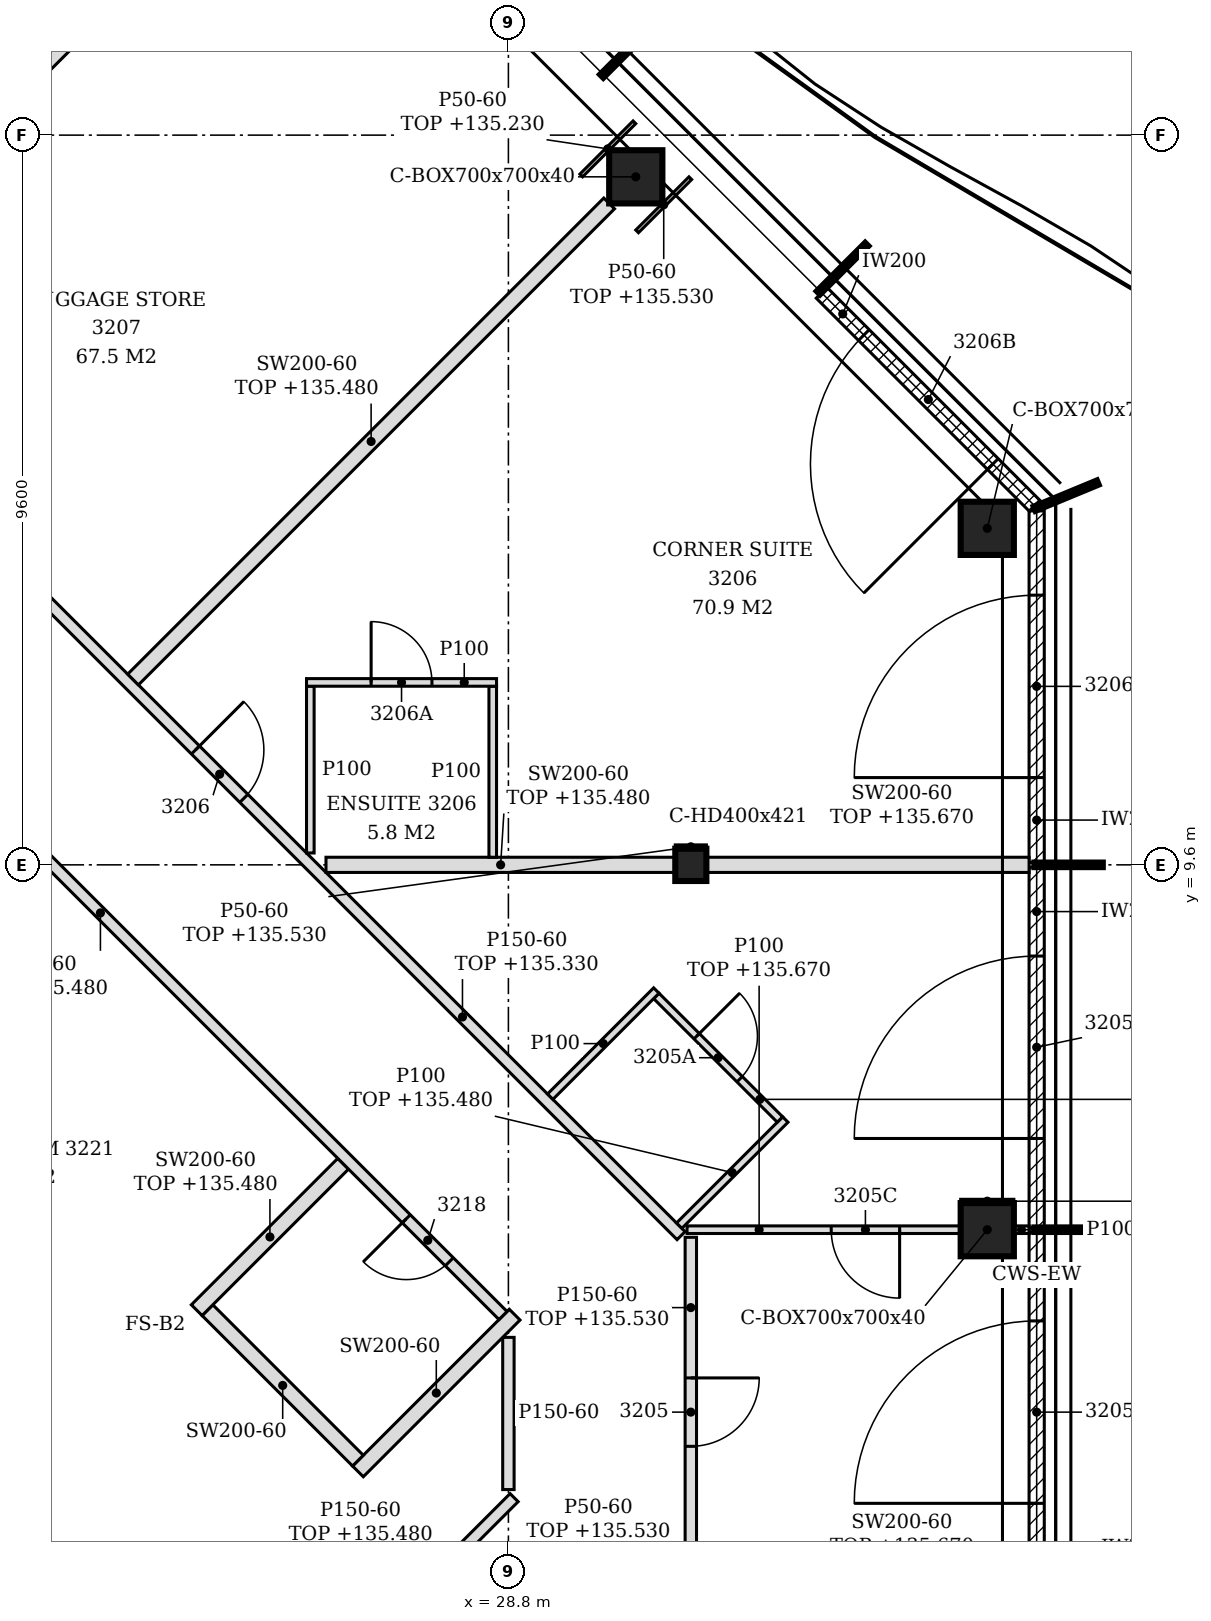
"""IFC4 building model, lengths in metres.
Left out: names, types, materials, properties, quantities, classifications, styles, units other than length and angle.
Written with IfcOpenShell. Run it as: python <this file> out.ifc"""

import sys

from ifc_helpers import new_model, si_unit, direction, frame, frame_2d, origin, origin_2d, place, context, subcontext, project, spatial, polyline, rectangle, hollow_rectangle, i_section, outline, extrude, element, fill, save


model = new_model("IFC4")
c1 = context("Model", 3, precision=1e-05, world=origin(), true_north=direction((0.0, 1.0)))
c2 = subcontext(c1, "Body", "Model", "MODEL_VIEW")
j1 = project(units=[si_unit("LENGTHUNIT", "METRE"), si_unit("PLANEANGLEUNIT", "RADIAN")], contexts=[c1])
p1 = place(None, origin())
s1 = spatial("IfcSite", under=j1, at=p1, CompositionType="ELEMENT")
p2 = place(p1, origin())
s2 = spatial("IfcBuilding", under=s1, at=p2, CompositionType="ELEMENT")
p3 = place(p2, frame((0.0, 0.0, 132.6)))
s3 = spatial("IfcBuildingStorey", under=s2, at=p3, CompositionType="ELEMENT", Elevation=132.6)
for number, where, z_axis, x_axis in (
    (1, (35.1, 4.8, -0.15), (0.0, 0.0, 1.0), (1.0, 0.0, 0.0)),
    (2, (35.1, 14.027, -0.15), (0.0, 0.0, 1.0), (1.0, 0.0, 0.0)),
    (3, (30.476, 18.652, -0.15), (0.0, 0.0, 1.0), (1.0, 0.0, 0.0)),
):
    element("IfcColumn", number, at=place(p3, frame(where, z_axis=z_axis, x_axis=x_axis)), inside=s3, PredefinedType="COLUMN", context=c2, shape_type="SweptSolid", body=[
        extrude(hollow_rectangle(XDim=0.7, YDim=0.7, WallThickness=0.04, at=origin_2d()), origin(), (0.0, 0.0, 1.0), 3.6),
    ])
p4 = place(p3, frame((31.2, 9.6, -0.15), z_axis=(0.0, 0.0, 1.0), x_axis=(1.0, 0.0, 0.0)))
e4 = element("IfcColumn", 4, at=p4, inside=s3, PredefinedType="COLUMN", context=c2, shape_type="SweptSolid", body=[
    extrude(i_section(OverallWidth=0.409, OverallDepth=0.425, WebThickness=0.033, FlangeThickness=0.052, FilletRadius=0.015, at=origin_2d()), origin(), (0.0, 0.0, 1.0), 3.6),
])
p5 = place(p3, frame((35.75, 0.03, 0.0), z_axis=(0.0, 0.0, 1.0), x_axis=(0.0, 1.0, 0.0)))
e5 = element("IfcWall", 5, at=p5, inside=s3, PredefinedType="NOTDEFINED", context=c2, shape_type="SweptSolid", body=[
    extrude(rectangle(XDim=4.74, YDim=0.2, at=frame_2d((2.37, 0.0))), origin(), (0.0, 0.0, 1.0), 3.45),
])
p6 = place(p5, frame((1.17, 0.0, 0.0)))
e6 = element("IfcOpeningElement", 6, at=p6, cuts=e5, PredefinedType="OPENING", context=c2, shape_type="SweptSolid", body=[
    extrude(rectangle(XDim=2.4, YDim=2.4, at=frame_2d((1.2, 1.2))), frame((0.0, 0.11, 0.0), z_axis=(0.0, -1.0, 0.0), x_axis=(1.0, 0.0, 0.0)), (0.0, 0.0, 1.0), 0.22),
])
p7 = place(p3, frame((35.75, 4.83, 0.0), z_axis=(0.0, 0.0, 1.0), x_axis=(0.0, 1.0, 0.0)))
e7 = element("IfcWall", 7, at=p7, inside=s3, PredefinedType="NOTDEFINED", context=c2, shape_type="SweptSolid", body=[
    extrude(rectangle(XDim=4.74, YDim=0.2, at=frame_2d((2.37, 0.0))), origin(), (0.0, 0.0, 1.0), 3.45),
])
p8 = place(p7, frame((1.17, 0.0, 0.0)))
e8 = element("IfcOpeningElement", 8, at=p8, cuts=e7, PredefinedType="OPENING", context=c2, shape_type="SweptSolid", body=[
    extrude(rectangle(XDim=2.4, YDim=2.4, at=frame_2d((1.2, 1.2))), frame((0.0, 0.11, 0.0), z_axis=(0.0, -1.0, 0.0), x_axis=(1.0, 0.0, 0.0)), (0.0, 0.0, 1.0), 0.22),
])
p9 = place(p3, frame((35.75, 9.63, 0.0), z_axis=(0.0, 0.0, 1.0), x_axis=(0.0, 1.0, 0.0)))
e9 = element("IfcWall", 9, at=p9, inside=s3, PredefinedType="NOTDEFINED", context=c2, shape_type="SweptSolid", body=[
    extrude(rectangle(XDim=4.626, YDim=0.2, at=frame_2d((2.313, 0.0))), origin(), (0.0, 0.0, 1.0), 3.45),
])
p10 = place(p9, frame((1.118, 0.0, 0.0)))
e10 = element("IfcOpeningElement", 10, at=p10, cuts=e9, PredefinedType="OPENING", context=c2, shape_type="SweptSolid", body=[
    extrude(rectangle(XDim=2.4, YDim=2.4, at=frame_2d((1.2, 1.2))), frame((0.0, 0.11, 0.0), z_axis=(0.0, -1.0, 0.0), x_axis=(1.0, 0.0, 0.0)), (0.0, 0.0, 1.0), 0.22),
])
p11 = place(p3, frame((35.722, 14.325, 0.0), z_axis=(0.0, 0.0, 1.0), x_axis=(-0.707106781187, 0.707106781187, 0.0)))
e11 = element("IfcWall", 11, at=p11, inside=s3, PredefinedType="NOTDEFINED", context=c2, shape_type="SweptSolid", body=[
    extrude(rectangle(XDim=3.962, YDim=0.2, at=frame_2d((1.981, 0.0))), origin(), (0.0, 0.0, 1.0), 3.45),
])
p12 = place(p11, frame((0.775, 0.0, 0.0)))
e12 = element("IfcOpeningElement", 12, at=p12, cuts=e11, PredefinedType="OPENING", context=c2, shape_type="SweptSolid", body=[
    extrude(rectangle(XDim=2.4, YDim=2.4, at=frame_2d((1.2, 1.2))), frame((0.0, 0.11, 0.0), z_axis=(0.0, -1.0, 0.0), x_axis=(1.0, 0.0, 0.0)), (0.0, 0.0, 1.0), 0.22),
])
p13 = place(p3, frame((26.528, -1.072, 0.0), z_axis=(0.0, 0.0, 1.0), x_axis=(0.707106781187, 0.707106781187, 0.0)))
e13 = element("IfcWall", 13, at=p13, inside=s3, PredefinedType="PARTITIONING", context=c2, shape_type="SweptSolid", body=[
    extrude(rectangle(XDim=3.319, YDim=0.15, at=frame_2d((1.66, 0.0))), origin(), (0.0, 0.0, 1.0), 2.88),
])
p14 = place(p3, frame((31.2, 0.387, 0.0), z_axis=(0.0, 0.0, 1.0), x_axis=(0.0, 1.0, 0.0)))
e14 = element("IfcWall", 14, at=p14, inside=s3, PredefinedType="PARTITIONING", context=c2, shape_type="SweptSolid", body=[
    extrude(rectangle(XDim=4.313, YDim=0.15, at=frame_2d((2.156, 0.0))), origin(), (0.0, 0.0, 1.0), 2.93),
])
p15 = place(p14, frame((1.563, 0.0, 0.0)))
e15 = element("IfcOpeningElement", 15, at=p15, cuts=e14, PredefinedType="OPENING", context=c2, shape_type="SweptSolid", body=[
    extrude(rectangle(XDim=0.9, YDim=2.1, at=frame_2d((0.45, 1.05))), frame((0.0, 0.085, 0.0), z_axis=(0.0, -1.0, 0.0), x_axis=(1.0, 0.0, 0.0)), (0.0, 0.0, 1.0), 0.17),
])
p16 = place(p3, frame((28.8, 1.381, 0.0), z_axis=(0.0, 0.0, 1.0), x_axis=(0.0, 1.0, 0.0)))
e16 = element("IfcWall", 16, at=p16, inside=s3, PredefinedType="PARTITIONING", context=c2, shape_type="SweptSolid", body=[
    extrude(rectangle(XDim=2.002, YDim=0.15, at=frame_2d((1.001, 0.0))), origin(), (0.0, 0.0, 1.0), 3.45),
])
p17 = place(p3, frame((26.82, 1.62, 0.0), z_axis=(0.0, 0.0, 1.0), x_axis=(0.707106781187, 0.707106781187, 0.0)))
e17 = element("IfcWall", 17, at=p17, inside=s3, PredefinedType="PARTITIONING", context=c2, shape_type="SweptSolid", body=[
    extrude(rectangle(XDim=2.916, YDim=0.2, at=frame_2d((1.458, 0.0))), origin(), (0.0, 0.0, 1.0), 3.45),
])
p18 = place(p3, frame((26.82, 1.762, 0.0), z_axis=(0.0, 0.0, 1.0), x_axis=(-0.707106781187, 0.707106781187, 0.0)))
e18 = element("IfcWall", 18, at=p18, inside=s3, PredefinedType="PARTITIONING", context=c2, shape_type="SweptSolid", body=[
    extrude(rectangle(XDim=2.799, YDim=0.2, at=frame_2d((1.4, 0.0))), origin(), (0.0, 0.0, 1.0), 3.45),
])
p19 = place(p3, frame((24.699, 3.741, 0.0), z_axis=(0.0, 0.0, 1.0), x_axis=(0.707106781187, 0.707106781187, 0.0)))
e19 = element("IfcWall", 19, at=p19, inside=s3, PredefinedType="PARTITIONING", context=c2, shape_type="SweptSolid", body=[
    extrude(rectangle(XDim=2.725, YDim=0.2, at=frame_2d((1.362, 0.0))), origin(), (0.0, 0.0, 1.0), 2.88),
])
p20 = place(p3, frame((28.729, 3.671, 0.0), z_axis=(0.0, 0.0, 1.0), x_axis=(-0.707106781187, 0.707106781187, 0.0)))
e20 = element("IfcWall", 20, at=p20, inside=s3, PredefinedType="PARTITIONING", context=c2, shape_type="SweptSolid", body=[
    extrude(rectangle(XDim=13.182, YDim=0.15, at=frame_2d((6.591, 0.0))), origin(), (0.0, 0.0, 1.0), 2.88),
])
p21 = place(p20, frame((1.0, 0.0, 0.0)))
e21 = element("IfcOpeningElement", 21, at=p21, cuts=e20, PredefinedType="OPENING", context=c2, shape_type="SweptSolid", body=[
    extrude(rectangle(XDim=0.8, YDim=2.1, at=frame_2d((0.4, 1.05))), frame((0.0, 0.085, 0.0), z_axis=(0.0, -1.0, 0.0), x_axis=(1.0, 0.0, 0.0)), (0.0, 0.0, 1.0), 0.17),
])
p22 = place(p3, frame((31.072, 4.722, 0.0), z_axis=(0.0, 0.0, 1.0), x_axis=(-0.707106781187, 0.707106781187, 0.0)))
e22 = element("IfcWall", 22, at=p22, inside=s3, PredefinedType="PARTITIONING", context=c2, shape_type="SweptSolid", body=[
    extrude(rectangle(XDim=23.688, YDim=0.15, at=frame_2d((11.844, 0.0))), origin(), (0.0, 0.0, 1.0), 2.73),
])
p23 = place(p22, frame((8.135, 0.0, 0.0)))
e23 = element("IfcOpeningElement", 23, at=p23, cuts=e22, PredefinedType="OPENING", context=c2, shape_type="SweptSolid", body=[
    extrude(rectangle(XDim=0.9, YDim=2.1, at=frame_2d((0.45, 1.05))), frame((0.0, 0.085, 0.0), z_axis=(0.0, -1.0, 0.0), x_axis=(1.0, 0.0, 0.0)), (0.0, 0.0, 1.0), 0.17),
])
p24 = place(p22, frame((13.091, 0.0, 0.0)))
e24 = element("IfcOpeningElement", 24, at=p24, cuts=e22, PredefinedType="OPENING", context=c2, shape_type="SweptSolid", body=[
    extrude(rectangle(XDim=0.9, YDim=2.1, at=frame_2d((0.45, 1.05))), frame((0.0, 0.085, 0.0), z_axis=(0.0, -1.0, 0.0), x_axis=(1.0, 0.0, 0.0)), (0.0, 0.0, 1.0), 0.17),
])
p25 = place(p22, frame((18.69, 0.0, 0.0)))
e25 = element("IfcOpeningElement", 25, at=p25, cuts=e22, PredefinedType="OPENING", context=c2, shape_type="SweptSolid", body=[
    extrude(rectangle(XDim=0.9, YDim=2.1, at=frame_2d((0.45, 1.05))), frame((0.0, 0.085, 0.0), z_axis=(0.0, -1.0, 0.0), x_axis=(1.0, 0.0, 0.0)), (0.0, 0.0, 1.0), 0.17),
])
p26 = place(p3, frame((31.15, 4.8, 0.0), z_axis=(0.0, 0.0, 1.0), x_axis=(1.0, 0.0, 0.0)))
e26 = element("IfcWall", 26, at=p26, inside=s3, PredefinedType="PARTITIONING", context=c2, shape_type="SweptSolid", body=[
    extrude(outline(polyline([(0.0, 0.0), (3.6, 0.0), (3.6, 3.07), (0.2, 3.07), (0.198, 2.93), (0.0, 2.93), (0.0, 0.0)])), frame((0.0, 0.05, 0.0), z_axis=(0.0, -1.0, 0.0), x_axis=(1.0, 0.0, 0.0)), (0.0, 0.0, 1.0), 0.1),
])
p27 = place(p26, frame((1.897, 0.0, 0.0)))
e27 = element("IfcOpeningElement", 27, at=p27, cuts=e26, PredefinedType="OPENING", context=c2, shape_type="SweptSolid", body=[
    extrude(rectangle(XDim=0.9, YDim=2.1, at=frame_2d((0.45, 1.05))), frame((0.0, 0.06, 0.0), z_axis=(0.0, -1.0, 0.0), x_axis=(1.0, 0.0, 0.0)), (0.0, 0.0, 1.0), 0.12),
])
p28 = place(p3, frame((35.45, 4.8, 0.0), z_axis=(0.0, 0.0, 1.0), x_axis=(1.0, 0.0, 0.0)))
e28 = element("IfcWall", 28, at=p28, inside=s3, PredefinedType="PARTITIONING", context=c2, shape_type="SweptSolid", body=[
    extrude(rectangle(XDim=0.2, YDim=0.1, at=frame_2d((0.1, 0.0))), origin(), (0.0, 0.0, 1.0), 3.45),
])
p29 = place(p3, frame((31.047, 4.853, 0.0), z_axis=(0.0, 0.0, 1.0), x_axis=(0.707044963048, 0.707168593921, 0.0)))
e29 = element("IfcWall", 29, at=p29, inside=s3, PredefinedType="PARTITIONING", context=c2, shape_type="SweptSolid", body=[
    extrude(rectangle(XDim=1.975, YDim=0.1, at=frame_2d((0.987, 0.0))), origin(), (0.0, 0.0, 1.0), 2.88),
])
p30 = place(p3, frame((32.373, 6.25, 0.0), z_axis=(0.0, 0.0, 1.0), x_axis=(-0.707159861304, 0.707053697085, 0.0)))
e30 = element("IfcWall", 30, at=p30, inside=s3, PredefinedType="PARTITIONING", context=c2, shape_type="SweptSolid", body=[
    extrude(rectangle(XDim=2.3, YDim=0.1, at=frame_2d((1.15, 0.0))), origin(), (0.0, 0.0, 1.0), 2.93),
])
p31 = place(p30, frame((0.75, 0.0, 0.0)))
e31 = element("IfcOpeningElement", 31, at=p31, cuts=e30, PredefinedType="OPENING", context=c2, shape_type="SweptSolid", body=[
    extrude(rectangle(XDim=0.8, YDim=2.1, at=frame_2d((0.4, 1.05))), frame((0.0, 0.06, 0.0), z_axis=(0.0, -1.0, 0.0), x_axis=(1.0, 0.0, 0.0)), (0.0, 0.0, 1.0), 0.12),
])
p32 = place(p3, frame((29.35, 6.55, 0.0), z_axis=(0.0, 0.0, 1.0), x_axis=(0.707106781187, 0.707106781187, 0.0)))
e32 = element("IfcWall", 32, at=p32, inside=s3, PredefinedType="PARTITIONING", context=c2, shape_type="SweptSolid", body=[
    extrude(rectangle(XDim=1.975, YDim=0.1, at=frame_2d((0.987, 0.0))), origin(), (0.0, 0.0, 1.0), 3.45),
])
p33 = place(p3, frame((26.4, 9.6, 0.0), z_axis=(0.0, 0.0, 1.0), x_axis=(1.0, 0.0, 0.0)))
e33 = element("IfcWall", 33, at=p33, inside=s3, PredefinedType="PARTITIONING", context=c2, shape_type="SweptSolid", body=[
    extrude(rectangle(XDim=4.595, YDim=0.2, at=frame_2d((2.298, 0.0))), origin(), (0.0, 0.0, 1.0), 2.88),
])
p34 = place(p3, frame((31.405, 9.6, 0.0), z_axis=(0.0, 0.0, 1.0), x_axis=(1.0, 0.0, 0.0)))
e34 = element("IfcWall", 34, at=p34, inside=s3, PredefinedType="PARTITIONING", context=c2, shape_type="SweptSolid", body=[
    extrude(outline(polyline([(0.0, 0.0), (4.245, 0.0), (4.246, 3.07), (3.845, 3.07), (3.844, 2.93), (3.545, 2.93), (3.543, 3.07), (0.0, 3.07), (0.0, 0.0)])), frame((0.0, 0.1, 0.0), z_axis=(0.0, -1.0, 0.0), x_axis=(1.0, 0.0, 0.0)), (0.0, 0.0, 1.0), 0.2),
])
p35 = place(p3, frame((28.594, 9.7, 0.0), z_axis=(0.0, 0.0, 1.0), x_axis=(0.0, 1.0, 0.0)))
e35 = element("IfcWall", 35, at=p35, inside=s3, PredefinedType="PARTITIONING", context=c2, shape_type="SweptSolid", body=[
    extrude(outline(polyline([(0.0, 0.0), (2.25, 0.0), (2.25, 3.45), (0.005, 3.45), (0.003, 2.88), (0.0, 2.88), (0.0, 0.0)])), frame((0.0, 0.05, 0.0), z_axis=(0.0, -1.0, 0.0), x_axis=(1.0, 0.0, 0.0)), (0.0, 0.0, 1.0), 0.1),
])
p36 = place(p3, frame((26.194, 9.756, 0.0), z_axis=(0.0, 0.0, 1.0), x_axis=(0.0, 1.0, 0.0)))
e36 = element("IfcWall", 36, at=p36, inside=s3, PredefinedType="PARTITIONING", context=c2, shape_type="SweptSolid", body=[
    extrude(rectangle(XDim=2.194, YDim=0.1, at=frame_2d((1.097, 0.0))), origin(), (0.0, 0.0, 1.0), 3.45),
])
p37 = place(p3, frame((23.862, 12.038, 0.0), z_axis=(0.0, 0.0, 1.0), x_axis=(0.707106781187, 0.707106781187, 0.0)))
e37 = element("IfcWall", 37, at=p37, inside=s3, PredefinedType="PARTITIONING", context=c2, shape_type="SweptSolid", body=[
    extrude(rectangle(XDim=8.858, YDim=0.2, at=frame_2d((4.429, 0.0))), origin(), (0.0, 0.0, 1.0), 2.88),
])
p38 = place(p3, frame((26.144, 12.0, 0.0), z_axis=(0.0, 0.0, 1.0), x_axis=(1.0, 0.0, 0.0)))
e38 = element("IfcWall", 38, at=p38, inside=s3, PredefinedType="PARTITIONING", context=c2, shape_type="SweptSolid", body=[
    extrude(rectangle(XDim=2.5, YDim=0.1, at=frame_2d((1.25, 0.0))), origin(), (0.0, 0.0, 1.0), 3.45),
])
p39 = place(p38, frame((0.85, 0.0, 0.0)))
e39 = element("IfcOpeningElement", 39, at=p39, cuts=e38, PredefinedType="OPENING", context=c2, shape_type="SweptSolid", body=[
    extrude(rectangle(XDim=0.8, YDim=2.1, at=frame_2d((0.4, 1.05))), frame((0.0, 0.06, 0.0), z_axis=(0.0, -1.0, 0.0), x_axis=(1.0, 0.0, 0.0)), (0.0, 0.0, 1.0), 0.12),
])
p40 = place(p3, frame((19.238, 16.662, 0.0), z_axis=(0.0, 0.0, 1.0), x_axis=(0.707120561855, 0.707093000249, 0.0)))
e40 = element("IfcWall", 40, at=p40, inside=s3, PredefinedType="PARTITIONING", context=c2, shape_type="SweptSolid", body=[
    extrude(rectangle(XDim=8.858, YDim=0.2, at=frame_2d((4.429, 0.0))), origin(), (0.0, 0.0, 1.0), 2.73),
])
p41 = place(p3, frame((34.75, 5.175, 0.0), z_axis=(0.0, 0.0, 1.0), x_axis=(1.0, 0.0, 0.0)))
e41 = element("IfcWall", 41, at=p41, inside=s3, PredefinedType="PARTITIONING", context=c2, shape_type="SweptSolid", body=[
    extrude(rectangle(XDim=0.7, YDim=0.05, at=frame_2d((0.35, 0.0))), origin(), (0.0, 0.0, 1.0), 2.93),
])
p42 = place(p3, frame((30.996, 9.837, 0.0), z_axis=(0.0, 0.0, 1.0), x_axis=(1.0, 0.0, 0.0)))
e42 = element("IfcWall", 42, at=p42, inside=s3, PredefinedType="PARTITIONING", context=c2, shape_type="SweptSolid", body=[
    extrude(rectangle(XDim=0.409, YDim=0.05, at=frame_2d((0.205, 0.0))), origin(), (0.0, 0.0, 1.0), 2.93),
])
p43 = place(p3, frame((29.758, 18.669, 0.0), z_axis=(0.0, 0.0, 1.0), x_axis=(0.707106781187, 0.707106781187, 0.0)))
e43 = element("IfcWall", 43, at=p43, inside=s3, PredefinedType="PARTITIONING", context=c2, shape_type="SweptSolid", body=[
    extrude(rectangle(XDim=0.99, YDim=0.05, at=frame_2d((0.495, 0.0))), origin(), (0.0, 0.0, 1.0), 2.63),
])
p44 = place(p3, frame((30.493, 17.934, 0.0), z_axis=(0.0, 0.0, 1.0), x_axis=(0.707106781187, 0.707106781187, 0.0)))
e44 = element("IfcWall", 44, at=p44, inside=s3, PredefinedType="PARTITIONING", context=c2, shape_type="SweptSolid", body=[
    extrude(rectangle(XDim=0.99, YDim=0.05, at=frame_2d((0.495, 0.0))), origin(), (0.0, 0.0, 1.0), 2.93),
])
p45 = place(p6, origin())
e45 = element("IfcDoor", 45, at=p45, inside=s3, OperationType="SINGLE_SWING_LEFT", PredefinedType="DOOR", context=c2, shape_type="SweptSolid", body=[
    extrude(rectangle(XDim=2.4, YDim=2.4, at=frame_2d((1.2, 1.2))), frame((0.0, 0.025, 0.0), z_axis=(0.0, -1.0, 0.0), x_axis=(1.0, 0.0, 0.0)), (0.0, 0.0, 1.0), 0.05),
])
fill(e6, e45)
p46 = place(p8, origin())
e46 = element("IfcDoor", 46, at=p46, inside=s3, OperationType="SINGLE_SWING_LEFT", PredefinedType="DOOR", context=c2, shape_type="SweptSolid", body=[
    extrude(rectangle(XDim=2.4, YDim=2.4, at=frame_2d((1.2, 1.2))), frame((0.0, 0.025, 0.0), z_axis=(0.0, -1.0, 0.0), x_axis=(1.0, 0.0, 0.0)), (0.0, 0.0, 1.0), 0.05),
])
fill(e8, e46)
p47 = place(p10, origin())
e47 = element("IfcDoor", 47, at=p47, inside=s3, OperationType="SINGLE_SWING_LEFT", PredefinedType="DOOR", context=c2, shape_type="SweptSolid", body=[
    extrude(rectangle(XDim=2.4, YDim=2.4, at=frame_2d((1.2, 1.2))), frame((0.0, 0.025, 0.0), z_axis=(0.0, -1.0, 0.0), x_axis=(1.0, 0.0, 0.0)), (0.0, 0.0, 1.0), 0.05),
])
fill(e10, e47)
p48 = place(p12, origin())
e48 = element("IfcDoor", 48, at=p48, inside=s3, OperationType="SINGLE_SWING_LEFT", PredefinedType="DOOR", context=c2, shape_type="SweptSolid", body=[
    extrude(rectangle(XDim=2.4, YDim=2.4, at=frame_2d((1.2, 1.2))), frame((0.0, 0.025, 0.0), z_axis=(0.0, -1.0, 0.0), x_axis=(1.0, 0.0, 0.0)), (0.0, 0.0, 1.0), 0.05),
])
fill(e12, e48)
p49 = place(p15, frame((0.9, 0.0, 0.0), z_axis=(0.0, 0.0, 1.0), x_axis=(-1.0, 0.0, 0.0)))
e49 = element("IfcDoor", 49, at=p49, inside=s3, OperationType="SINGLE_SWING_LEFT", PredefinedType="DOOR", context=c2, shape_type="SweptSolid", body=[
    extrude(rectangle(XDim=0.9, YDim=2.1, at=frame_2d((0.45, 1.05))), frame((0.0, 0.025, 0.0), z_axis=(0.0, -1.0, 0.0), x_axis=(1.0, 0.0, 0.0)), (0.0, 0.0, 1.0), 0.05),
])
fill(e15, e49)
p50 = place(p27, frame((0.9, 0.0, 0.0), z_axis=(0.0, 0.0, 1.0), x_axis=(-1.0, 0.0, 0.0)))
e50 = element("IfcDoor", 50, at=p50, inside=s3, OperationType="SINGLE_SWING_LEFT", PredefinedType="DOOR", context=c2, shape_type="SweptSolid", body=[
    extrude(rectangle(XDim=0.9, YDim=2.1, at=frame_2d((0.45, 1.05))), frame((0.0, 0.025, 0.0), z_axis=(0.0, -1.0, 0.0), x_axis=(1.0, 0.0, 0.0)), (0.0, 0.0, 1.0), 0.05),
])
fill(e27, e50)
p51 = place(p31, frame((0.8, 0.0, 0.0), z_axis=(0.0, 0.0, 1.0), x_axis=(-1.0, 0.0, 0.0)))
e51 = element("IfcDoor", 51, at=p51, inside=s3, OperationType="SINGLE_SWING_LEFT", PredefinedType="DOOR", context=c2, shape_type="SweptSolid", body=[
    extrude(rectangle(XDim=0.8, YDim=2.1, at=frame_2d((0.4, 1.05))), frame((0.0, 0.025, 0.0), z_axis=(0.0, -1.0, 0.0), x_axis=(1.0, 0.0, 0.0)), (0.0, 0.0, 1.0), 0.05),
])
fill(e31, e51)
p52 = place(p23, frame((0.9, 0.0, 0.0), z_axis=(0.0, 0.0, 1.0), x_axis=(-1.0, 0.0, 0.0)))
e52 = element("IfcDoor", 52, at=p52, inside=s3, OperationType="SINGLE_SWING_LEFT", PredefinedType="DOOR", context=c2, shape_type="SweptSolid", body=[
    extrude(rectangle(XDim=0.9, YDim=2.1, at=frame_2d((0.45, 1.05))), frame((0.0, 0.025, 0.0), z_axis=(0.0, -1.0, 0.0), x_axis=(1.0, 0.0, 0.0)), (0.0, 0.0, 1.0), 0.05),
])
fill(e23, e52)
p53 = place(p39, origin())
e53 = element("IfcDoor", 53, at=p53, inside=s3, OperationType="SINGLE_SWING_LEFT", PredefinedType="DOOR", context=c2, shape_type="SweptSolid", body=[
    extrude(rectangle(XDim=0.8, YDim=2.1, at=frame_2d((0.4, 1.05))), frame((0.0, 0.025, 0.0), z_axis=(0.0, -1.0, 0.0), x_axis=(1.0, 0.0, 0.0)), (0.0, 0.0, 1.0), 0.05),
])
fill(e39, e53)
p54 = place(p21, origin())
e54 = element("IfcDoor", 54, at=p54, inside=s3, OperationType="SINGLE_SWING_RIGHT", PredefinedType="DOOR", context=c2, shape_type="SweptSolid", body=[
    extrude(rectangle(XDim=0.8, YDim=2.1, at=frame_2d((0.4, 1.05))), frame((0.0, 0.025, 0.0), z_axis=(0.0, -1.0, 0.0), x_axis=(1.0, 0.0, 0.0)), (0.0, 0.0, 1.0), 0.05),
])
fill(e21, e54)
save(model, sys.argv[1])
